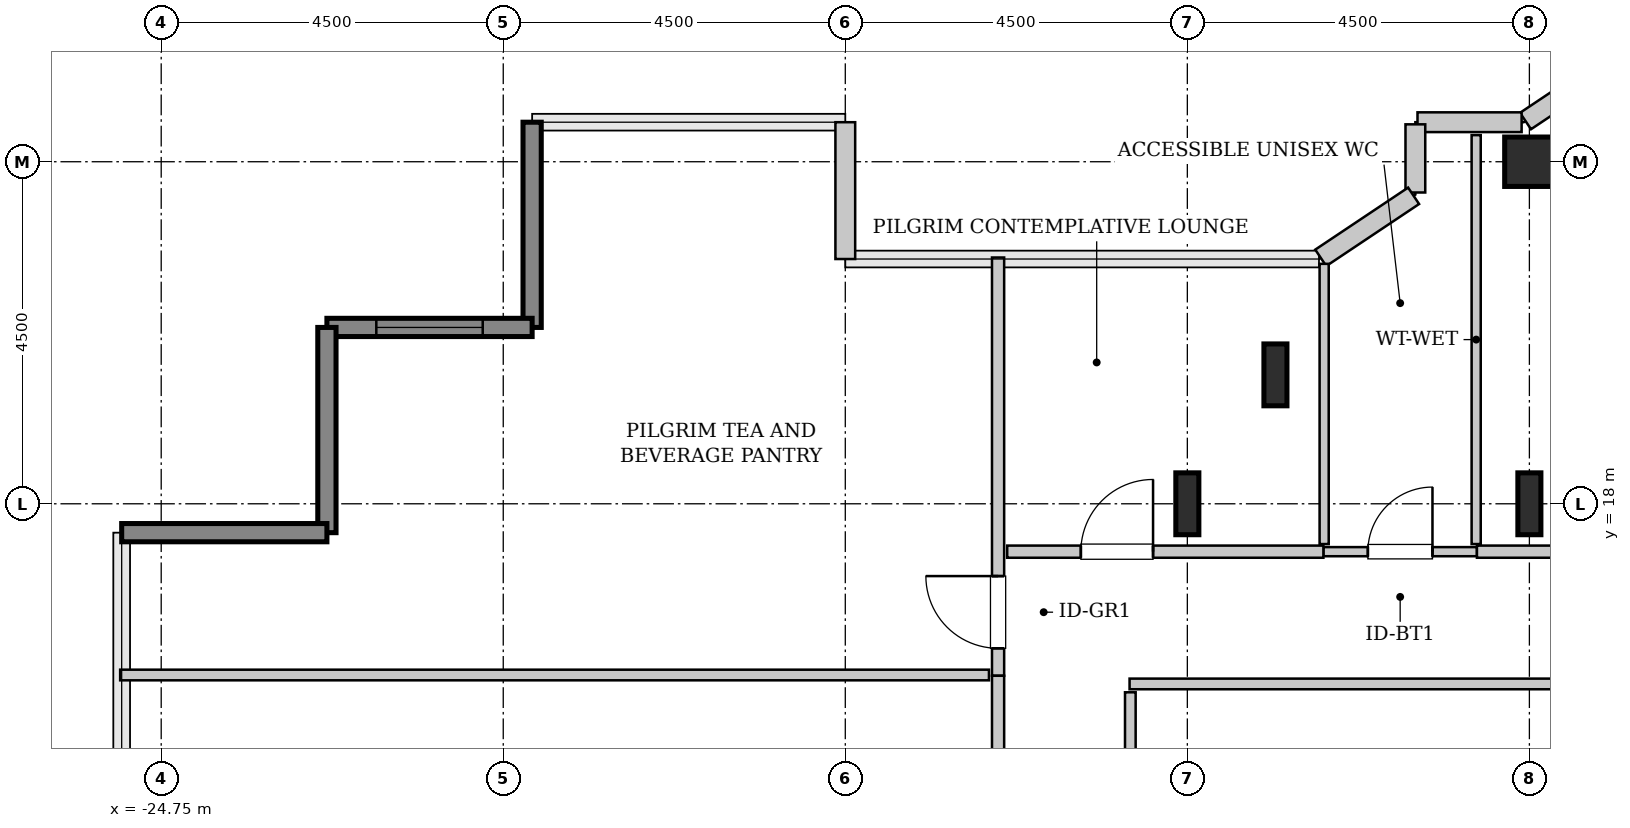
"""IFC4 building model, lengths in metres.
Left out: names, types, materials, properties, quantities, classifications, styles, units other than length and angle.
Written with IfcOpenShell. Run it as: python <this file> out.ifc"""

import sys

from ifc_helpers import new_model, si_unit, direction, frame, frame_2d, origin, origin_2d, place, context, subcontext, project, spatial, rectangle, hollow_rectangle, i_section, extrude, source, transform, mapped, element, fill, save


model = new_model("IFC4")
c1 = context("Model", 3, precision=1e-05, world=origin(), true_north=direction((0.0, 1.0)))
c2 = subcontext(c1, "Body", "Model", "MODEL_VIEW")
j1 = project(units=[si_unit("LENGTHUNIT", "METRE"), si_unit("PLANEANGLEUNIT", "RADIAN")], contexts=[c1])
p1 = place(None, origin())
s1 = spatial("IfcSite", under=j1, at=p1, CompositionType="ELEMENT")
p2 = place(p1, origin())
s2 = spatial("IfcBuilding", under=s1, at=p2, CompositionType="ELEMENT")
p3 = place(p2, frame((0.0, 0.0, 237.0)))
s3 = spatial("IfcBuildingStorey", under=s2, at=p3, CompositionType="ELEMENT", Elevation=237.0)
m1 = source(origin(), c2, "Body", "SweptSolid", [
    extrude(i_section(OverallWidth=0.303, OverallDepth=0.814, WebThickness=0.021, FlangeThickness=0.04, FilletRadius=0.03, at=origin_2d()), origin(), (0.0, 0.0, 1.0), 3.8),
])
for number, where, z_axis, x_axis in (
    (1, (-11.25, 18.0, 0.0), (0.0, 0.0, 1.0), (1.0, 0.0, 0.0)),
    (2, (-10.091, 19.696, 0.0), (0.0, 0.0, 1.0), (1.0, 0.0, 0.0)),
    (3, (-6.75, 18.0, 0.0), (0.0, 0.0, 1.0), (1.0, 0.0, 0.0)),
):
    element("IfcColumn", number, at=place(p3, frame(where, z_axis=z_axis, x_axis=x_axis)), inside=s3, PredefinedType="COLUMN", context=c2, shape_type="MappedRepresentation", body=[
        mapped(m1, transform((0.0, 0.0, 0.0), x_axis=(1.0, 0.0, 0.0), y_axis=(0.0, 1.0, 0.0), z_axis=(0.0, 0.0, 1.0), scale=1.0)),
    ])
m2 = source(origin(), c2, "Body", "SweptSolid", [
    extrude(hollow_rectangle(XDim=0.65, YDim=0.65, WallThickness=0.032, InnerFilletRadius=0.032, OuterFilletRadius=0.064, at=origin_2d()), origin(), (0.0, 0.0, 1.0), 3.8),
])
p4 = place(p3, frame((-6.75, 22.5, 0.0), z_axis=(0.0, 0.0, 1.0), x_axis=(1.0, 0.0, 0.0)))
e4 = element("IfcColumn", 4, at=p4, inside=s3, PredefinedType="COLUMN", context=c2, shape_type="MappedRepresentation", body=[
    mapped(m2, transform((0.0, 0.0, 0.0), x_axis=(1.0, 0.0, 0.0), y_axis=(0.0, 1.0, 0.0), z_axis=(0.0, 0.0, 1.0), scale=1.0)),
])
m3 = source(origin(), c2, "Body", "SweptSolid", [
    extrude(rectangle(XDim=0.565, YDim=0.26, at=frame_2d((0.283, 0.0))), origin(), (0.0, 0.0, 1.0), 3.55),
])
p5 = place(p3, frame((-6.331, 23.35, 0.0), z_axis=(0.0, 0.0, 1.0), x_axis=(-0.831651492666, -0.555297933317, 0.0)))
e5 = element("IfcWall", 5, at=p5, inside=s3, PredefinedType="SOLIDWALL", context=c2, shape_type="MappedRepresentation", body=[
    mapped(m3, transform((0.0, 0.0, 0.0), x_axis=(1.0, 0.0, 0.0), y_axis=(0.0, 1.0, 0.0), z_axis=(0.0, 0.0, 1.0), scale=1.0)),
])
m4 = source(origin(), c2, "Body", "SweptSolid", [
    extrude(rectangle(XDim=1.37, YDim=0.26, at=frame_2d((0.685, 0.0))), origin(), (0.0, 0.0, 1.0), 3.55),
])
p6 = place(p3, frame((-6.852, 23.02, 0.0), z_axis=(0.0, 0.0, 1.0), x_axis=(-1.0, 0.0, 0.0)))
e6 = element("IfcWall", 6, at=p6, inside=s3, PredefinedType="SOLIDWALL", context=c2, shape_type="MappedRepresentation", body=[
    mapped(m4, transform((0.0, 0.0, 0.0), x_axis=(1.0, 0.0, 0.0), y_axis=(0.0, 1.0, 0.0), z_axis=(0.0, 0.0, 1.0), scale=1.0)),
])
m5 = source(origin(), c2, "Body", "SweptSolid", [
    extrude(rectangle(XDim=0.897, YDim=0.26, at=frame_2d((0.448, 0.0))), origin(), (0.0, 0.0, 1.0), 3.55),
])
p7 = place(p3, frame((-8.25, 22.992, 0.0), z_axis=(0.0, 0.0, 1.0), x_axis=(0.0, -1.0, 0.0)))
e7 = element("IfcWall", 7, at=p7, inside=s3, PredefinedType="SOLIDWALL", context=c2, shape_type="MappedRepresentation", body=[
    mapped(m5, transform((0.0, 0.0, 0.0), x_axis=(1.0, 0.0, 0.0), y_axis=(0.0, 1.0, 0.0), z_axis=(0.0, 0.0, 1.0), scale=1.0)),
])
m6 = source(origin(), c2, "Body", "SweptSolid", [
    extrude(rectangle(XDim=1.469, YDim=0.26, at=frame_2d((0.734, 0.0))), origin(), (0.0, 0.0, 1.0), 3.55),
])
p8 = place(p3, frame((-8.273, 22.052, 0.0), z_axis=(0.0, 0.0, 1.0), x_axis=(-0.831461760506, -0.555581983884, 0.0)))
e8 = element("IfcWall", 8, at=p8, inside=s3, PredefinedType="SOLIDWALL", context=c2, shape_type="MappedRepresentation", body=[
    mapped(m6, transform((0.0, 0.0, 0.0), x_axis=(1.0, 0.0, 0.0), y_axis=(0.0, 1.0, 0.0), z_axis=(0.0, 0.0, 1.0), scale=1.0)),
])
m7 = source(origin(), c2, "Body", "SweptSolid", [
    extrude(rectangle(XDim=1.8, YDim=0.26, at=frame_2d((0.9, 0.0))), origin(), (0.0, 0.0, 1.0), 3.55),
])
p9 = place(p3, frame((-15.75, 21.22, 0.0), z_axis=(0.0, 0.0, 1.0), x_axis=(0.0, 1.0, 0.0)))
e9 = element("IfcWall", 9, at=p9, inside=s3, PredefinedType="SOLIDWALL", context=c2, shape_type="MappedRepresentation", body=[
    mapped(m7, transform((0.0, 0.0, 0.0), x_axis=(1.0, 0.0, 0.0), y_axis=(0.0, 1.0, 0.0), z_axis=(0.0, 0.0, 1.0), scale=1.0)),
])
m8 = source(origin(), c2, "Body", "SweptSolid", [
    extrude(rectangle(XDim=2.7, YDim=0.24, at=frame_2d((1.35, 0.0))), origin(), (0.0, 0.0, 1.0), 3.55),
])
p10 = place(p3, frame((-19.87, 23.02, 0.0), z_axis=(0.0, 0.0, 1.0), x_axis=(0.0, -1.0, 0.0)))
e10 = element("IfcWall", 10, at=p10, inside=s3, PredefinedType="SHEAR", context=c2, shape_type="MappedRepresentation", body=[
    mapped(m8, transform((0.0, 0.0, 0.0), x_axis=(1.0, 0.0, 0.0), y_axis=(0.0, 1.0, 0.0), z_axis=(0.0, 0.0, 1.0), scale=1.0)),
])
p11 = place(p3, frame((-19.87, 20.32, 0.0), z_axis=(0.0, 0.0, 1.0), x_axis=(-1.0, 0.0, 0.0)))
e11 = element("IfcWall", 11, at=p11, inside=s3, PredefinedType="SHEAR", context=c2, shape_type="MappedRepresentation", body=[
    mapped(m8, transform((0.0, 0.0, 0.0), x_axis=(1.0, 0.0, 0.0), y_axis=(0.0, 1.0, 0.0), z_axis=(0.0, 0.0, 1.0), scale=1.0)),
])
p12 = place(p11, frame((0.65, 0.0, 0.85)))
e12 = element("IfcOpeningElement", 12, at=p12, cuts=e11, PredefinedType="OPENING", context=c2, shape_type="SweptSolid", body=[
    extrude(rectangle(XDim=1.4, YDim=1.8, at=frame_2d((0.7, 0.9))), frame((0.0, 0.13, 0.0), z_axis=(0.0, -1.0, 0.0), x_axis=(1.0, 0.0, 0.0)), (0.0, 0.0, 1.0), 0.26),
])
for number, where, z_axis, x_axis in (
    (13, (-22.57, 20.32, 0.0), (0.0, 0.0, 1.0), (0.0, -1.0, 0.0)),
    (14, (-22.57, 17.62, 0.0), (0.0, 0.0, 1.0), (-1.0, 0.0, 0.0)),
):
    element("IfcWall", number, at=place(p3, frame(where, z_axis=z_axis, x_axis=x_axis)), inside=s3, PredefinedType="SHEAR", context=c2, shape_type="MappedRepresentation", body=[
        mapped(m8, transform((0.0, 0.0, 0.0), x_axis=(1.0, 0.0, 0.0), y_axis=(0.0, 1.0, 0.0), z_axis=(0.0, 0.0, 1.0), scale=1.0)),
    ])
m9 = source(origin(), c2, "Body", "SweptSolid", [
    extrude(rectangle(XDim=2.02, YDim=0.12, at=frame_2d((1.01, 0.0))), origin(), (0.0, 0.0, 1.0), 3.535),
])
p13 = place(p3, frame((-9.46, 17.37, 0.0), z_axis=(0.0, 0.0, 1.0), x_axis=(1.0, 0.0, 0.0)))
e15 = element("IfcWall", 15, at=p13, inside=s3, PredefinedType="PLUMBINGWALL", context=c2, shape_type="MappedRepresentation", body=[
    mapped(m9, transform((0.0, 0.0, 0.0), x_axis=(1.0, 0.0, 0.0), y_axis=(0.0, 1.0, 0.0), z_axis=(0.0, 0.0, 1.0), scale=1.0)),
])
p14 = place(p13, frame((0.585, 0.0, 0.0)))
e16 = element("IfcOpeningElement", 16, at=p14, cuts=e15, PredefinedType="OPENING", context=c2, shape_type="SweptSolid", body=[
    extrude(rectangle(XDim=0.85, YDim=2.1, at=frame_2d((0.425, 1.05))), frame((0.0, 0.07, 0.0), z_axis=(0.0, -1.0, 0.0), x_axis=(1.0, 0.0, 0.0)), (0.0, 0.0, 1.0), 0.14),
])
m10 = source(origin(), c2, "Body", "SweptSolid", [
    extrude(rectangle(XDim=5.38, YDim=0.12, at=frame_2d((2.69, 0.0))), origin(), (0.0, 0.0, 1.0), 3.535),
])
p15 = place(p3, frame((-7.45, 17.47, 0.0), z_axis=(0.0, 0.0, 1.0), x_axis=(0.0, 1.0, 0.0)))
e17 = element("IfcWall", 17, at=p15, inside=s3, PredefinedType="PLUMBINGWALL", context=c2, shape_type="MappedRepresentation", body=[
    mapped(m10, transform((0.0, 0.0, 0.0), x_axis=(1.0, 0.0, 0.0), y_axis=(0.0, 1.0, 0.0), z_axis=(0.0, 0.0, 1.0), scale=1.0)),
])
m11 = source(origin(), c2, "Body", "SweptSolid", [
    extrude(rectangle(XDim=3.687, YDim=0.12, at=frame_2d((1.843, 0.0))), origin(), (0.0, 0.0, 1.0), 3.535),
])
p16 = place(p3, frame((-9.45, 17.47, 0.0), z_axis=(0.0, 0.0, 1.0), x_axis=(0.0, 1.0, 0.0)))
e18 = element("IfcWall", 18, at=p16, inside=s3, PredefinedType="PLUMBINGWALL", context=c2, shape_type="MappedRepresentation", body=[
    mapped(m11, transform((0.0, 0.0, 0.0), x_axis=(1.0, 0.0, 0.0), y_axis=(0.0, 1.0, 0.0), z_axis=(0.0, 0.0, 1.0), scale=1.0)),
])
m12 = source(origin(), c2, "Body", "SweptSolid", [
    extrude(rectangle(XDim=5.502, YDim=0.16, at=frame_2d((2.751, 0.0))), origin(), (0.0, 0.0, 1.0), 3.535),
])
p17 = place(p3, frame((-13.74, 15.738, 0.0), z_axis=(0.0, 0.0, 1.0), x_axis=(0.0, 1.0, 0.0)))
e19 = element("IfcWall", 19, at=p17, inside=s3, PredefinedType="PARTITIONING", context=c2, shape_type="MappedRepresentation", body=[
    mapped(m12, transform((0.0, 0.0, 0.0), x_axis=(1.0, 0.0, 0.0), y_axis=(0.0, 1.0, 0.0), z_axis=(0.0, 0.0, 1.0), scale=1.0)),
])
p18 = place(p17, frame((0.361, 0.0, 0.0)))
e20 = element("IfcOpeningElement", 20, at=p18, cuts=e19, PredefinedType="OPENING", context=c2, shape_type="SweptSolid", body=[
    extrude(rectangle(XDim=0.95, YDim=2.1, at=frame_2d((0.475, 1.05))), frame((0.0, 0.09, 0.0), z_axis=(0.0, -1.0, 0.0), x_axis=(1.0, 0.0, 0.0)), (0.0, 0.0, 1.0), 0.18),
])
m13 = source(origin(), c2, "Body", "SweptSolid", [
    extrude(rectangle(XDim=11.43, YDim=0.14, at=frame_2d((5.715, 0.0))), origin(), (0.0, 0.0, 1.0), 3.535),
])
p19 = place(p3, frame((-25.29, 15.748, 0.0), z_axis=(0.0, 0.0, 1.0), x_axis=(1.0, 0.0, 0.0)))
e21 = element("IfcWall", 21, at=p19, inside=s3, PredefinedType="PARTITIONING", context=c2, shape_type="MappedRepresentation", body=[
    mapped(m13, transform((0.0, 0.0, 0.0), x_axis=(1.0, 0.0, 0.0), y_axis=(0.0, 1.0, 0.0), z_axis=(0.0, 0.0, 1.0), scale=1.0)),
])
m14 = source(origin(), c2, "Body", "SweptSolid", [
    extrude(rectangle(XDim=7.242, YDim=0.16, at=frame_2d((3.621, 0.0))), origin(), (0.0, 0.0, 1.0), 3.535),
])
p20 = place(p3, frame((-13.74, 8.495, 0.0), z_axis=(0.0, 0.0, 1.0), x_axis=(0.0, 1.0, 0.0)))
e22 = element("IfcWall", 22, at=p20, inside=s3, PredefinedType="PARTITIONING", context=c2, shape_type="MappedRepresentation", body=[
    mapped(m14, transform((0.0, 0.0, 0.0), x_axis=(1.0, 0.0, 0.0), y_axis=(0.0, 1.0, 0.0), z_axis=(0.0, 0.0, 1.0), scale=1.0)),
])
p21 = place(p20, frame((3.146, 0.0, 0.0)))
e23 = element("IfcOpeningElement", 23, at=p21, cuts=e22, PredefinedType="OPENING", context=c2, shape_type="SweptSolid", body=[
    extrude(rectangle(XDim=0.95, YDim=2.1, at=frame_2d((0.475, 1.05))), frame((0.0, 0.09, 0.0), z_axis=(0.0, -1.0, 0.0), x_axis=(1.0, 0.0, 0.0)), (0.0, 0.0, 1.0), 0.18),
])
m15 = source(origin(), c2, "Body", "SweptSolid", [
    extrude(rectangle(XDim=10.215, YDim=0.14, at=frame_2d((5.107, 0.0))), origin(), (0.0, 0.0, 1.0), 3.535),
])
p22 = place(p3, frame((-12.01, 15.63, 0.0), z_axis=(0.0, 0.0, 1.0), x_axis=(1.0, 0.0, 0.0)))
e24 = element("IfcWall", 24, at=p22, inside=s3, PredefinedType="PARTITIONING", context=c2, shape_type="MappedRepresentation", body=[
    mapped(m15, transform((0.0, 0.0, 0.0), x_axis=(1.0, 0.0, 0.0), y_axis=(0.0, 1.0, 0.0), z_axis=(0.0, 0.0, 1.0), scale=1.0)),
])
m16 = source(origin(), c2, "Body", "SweptSolid", [
    extrude(rectangle(XDim=3.93, YDim=0.14, at=frame_2d((1.965, 0.0))), origin(), (0.0, 0.0, 1.0), 3.535),
])
p23 = place(p3, frame((-12.0, 11.59, 0.0), z_axis=(0.0, 0.0, 1.0), x_axis=(0.0, 1.0, 0.0)))
e25 = element("IfcWall", 25, at=p23, inside=s3, PredefinedType="PARTITIONING", context=c2, shape_type="MappedRepresentation", body=[
    mapped(m16, transform((0.0, 0.0, 0.0), x_axis=(1.0, 0.0, 0.0), y_axis=(0.0, 1.0, 0.0), z_axis=(0.0, 0.0, 1.0), scale=1.0)),
])
m17 = source(origin(), c2, "Body", "SweptSolid", [
    extrude(rectangle(XDim=5.645, YDim=0.16, at=frame_2d((2.823, 0.0))), origin(), (0.0, 0.0, 1.0), 3.535),
])
p24 = place(p3, frame((-7.44, 17.37, 0.0), z_axis=(0.0, 0.0, 1.0), x_axis=(1.0, 0.0, 0.0)))
e26 = element("IfcWall", 26, at=p24, inside=s3, PredefinedType="PARTITIONING", context=c2, shape_type="MappedRepresentation", body=[
    mapped(m17, transform((0.0, 0.0, 0.0), x_axis=(1.0, 0.0, 0.0), y_axis=(0.0, 1.0, 0.0), z_axis=(0.0, 0.0, 1.0), scale=1.0)),
])
p25 = place(p24, frame((2.347, 0.0, 0.0)))
e27 = element("IfcOpeningElement", 27, at=p25, cuts=e26, PredefinedType="OPENING", context=c2, shape_type="SweptSolid", body=[
    extrude(rectangle(XDim=0.95, YDim=2.1, at=frame_2d((0.475, 1.05))), frame((0.0, 0.09, 0.0), z_axis=(0.0, -1.0, 0.0), x_axis=(1.0, 0.0, 0.0)), (0.0, 0.0, 1.0), 0.18),
])
m18 = source(origin(), c2, "Body", "SweptSolid", [
    extrude(rectangle(XDim=4.16, YDim=0.16, at=frame_2d((2.08, 0.0))), origin(), (0.0, 0.0, 1.0), 3.535),
])
p26 = place(p3, frame((-13.62, 17.37, 0.0), z_axis=(0.0, 0.0, 1.0), x_axis=(1.0, 0.0, 0.0)))
e28 = element("IfcWall", 28, at=p26, inside=s3, PredefinedType="PARTITIONING", context=c2, shape_type="MappedRepresentation", body=[
    mapped(m18, transform((0.0, 0.0, 0.0), x_axis=(1.0, 0.0, 0.0), y_axis=(0.0, 1.0, 0.0), z_axis=(0.0, 0.0, 1.0), scale=1.0)),
])
p27 = place(p26, frame((0.969, 0.0, 0.0)))
e29 = element("IfcOpeningElement", 29, at=p27, cuts=e28, PredefinedType="OPENING", context=c2, shape_type="SweptSolid", body=[
    extrude(rectangle(XDim=0.95, YDim=2.1, at=frame_2d((0.475, 1.05))), frame((0.0, 0.09, 0.0), z_axis=(0.0, -1.0, 0.0), x_axis=(1.0, 0.0, 0.0)), (0.0, 0.0, 1.0), 0.18),
])
m19 = source(origin(), c2, "Body", "SweptSolid", [
    extrude(rectangle(XDim=1.4, YDim=1.8, at=frame_2d((0.7, 0.9))), frame((0.0, 0.03, 0.0), z_axis=(0.0, -1.0, 0.0), x_axis=(1.0, 0.0, 0.0)), (0.0, 0.0, 1.0), 0.06),
])
p28 = place(p12, origin())
e30 = element("IfcWindow", 30, at=p28, inside=s3, PartitioningType="SINGLE_PANEL", PredefinedType="WINDOW", context=c2, shape_type="MappedRepresentation", body=[
    mapped(m19, transform((0.0, 0.0, 0.0), x_axis=(1.0, 0.0, 0.0), y_axis=(0.0, 1.0, 0.0), z_axis=(0.0, 0.0, 1.0), scale=1.0)),
])
fill(e12, e30)
m20 = source(origin(), c2, "Body", "SweptSolid", [
    extrude(rectangle(XDim=0.85, YDim=2.1, at=frame_2d((0.425, 1.05))), frame((0.0, 0.025, 0.0), z_axis=(0.0, -1.0, 0.0), x_axis=(1.0, 0.0, 0.0)), (0.0, 0.0, 1.0), 0.05),
])
p29 = place(p14, origin())
e31 = element("IfcDoor", 31, at=p29, inside=s3, OperationType="SINGLE_SWING_RIGHT", PredefinedType="DOOR", context=c2, shape_type="MappedRepresentation", body=[
    mapped(m20, transform((0.0, 0.0, 0.0), x_axis=(1.0, 0.0, 0.0), y_axis=(0.0, 1.0, 0.0), z_axis=(0.0, 0.0, 1.0), scale=1.0)),
])
fill(e16, e31)
m21 = source(origin(), c2, "Body", "SweptSolid", [
    extrude(rectangle(XDim=0.95, YDim=2.1, at=frame_2d((0.475, 1.05))), frame((0.0, 0.025, 0.0), z_axis=(0.0, -1.0, 0.0), x_axis=(1.0, 0.0, 0.0)), (0.0, 0.0, 1.0), 0.05),
])
p30 = place(p18, origin())
e32 = element("IfcDoor", 32, at=p30, inside=s3, OperationType="SINGLE_SWING_RIGHT", PredefinedType="DOOR", context=c2, shape_type="MappedRepresentation", body=[
    mapped(m21, transform((0.0, 0.0, 0.0), x_axis=(1.0, 0.0, 0.0), y_axis=(0.0, 1.0, 0.0), z_axis=(0.0, 0.0, 1.0), scale=1.0)),
])
fill(e20, e32)
p31 = place(p27, origin())
e33 = element("IfcDoor", 33, at=p31, inside=s3, OperationType="SINGLE_SWING_RIGHT", PredefinedType="DOOR", context=c2, shape_type="MappedRepresentation", body=[
    mapped(m21, transform((0.0, 0.0, 0.0), x_axis=(1.0, 0.0, 0.0), y_axis=(0.0, 1.0, 0.0), z_axis=(0.0, 0.0, 1.0), scale=1.0)),
])
fill(e29, e33)
save(model, sys.argv[1])
